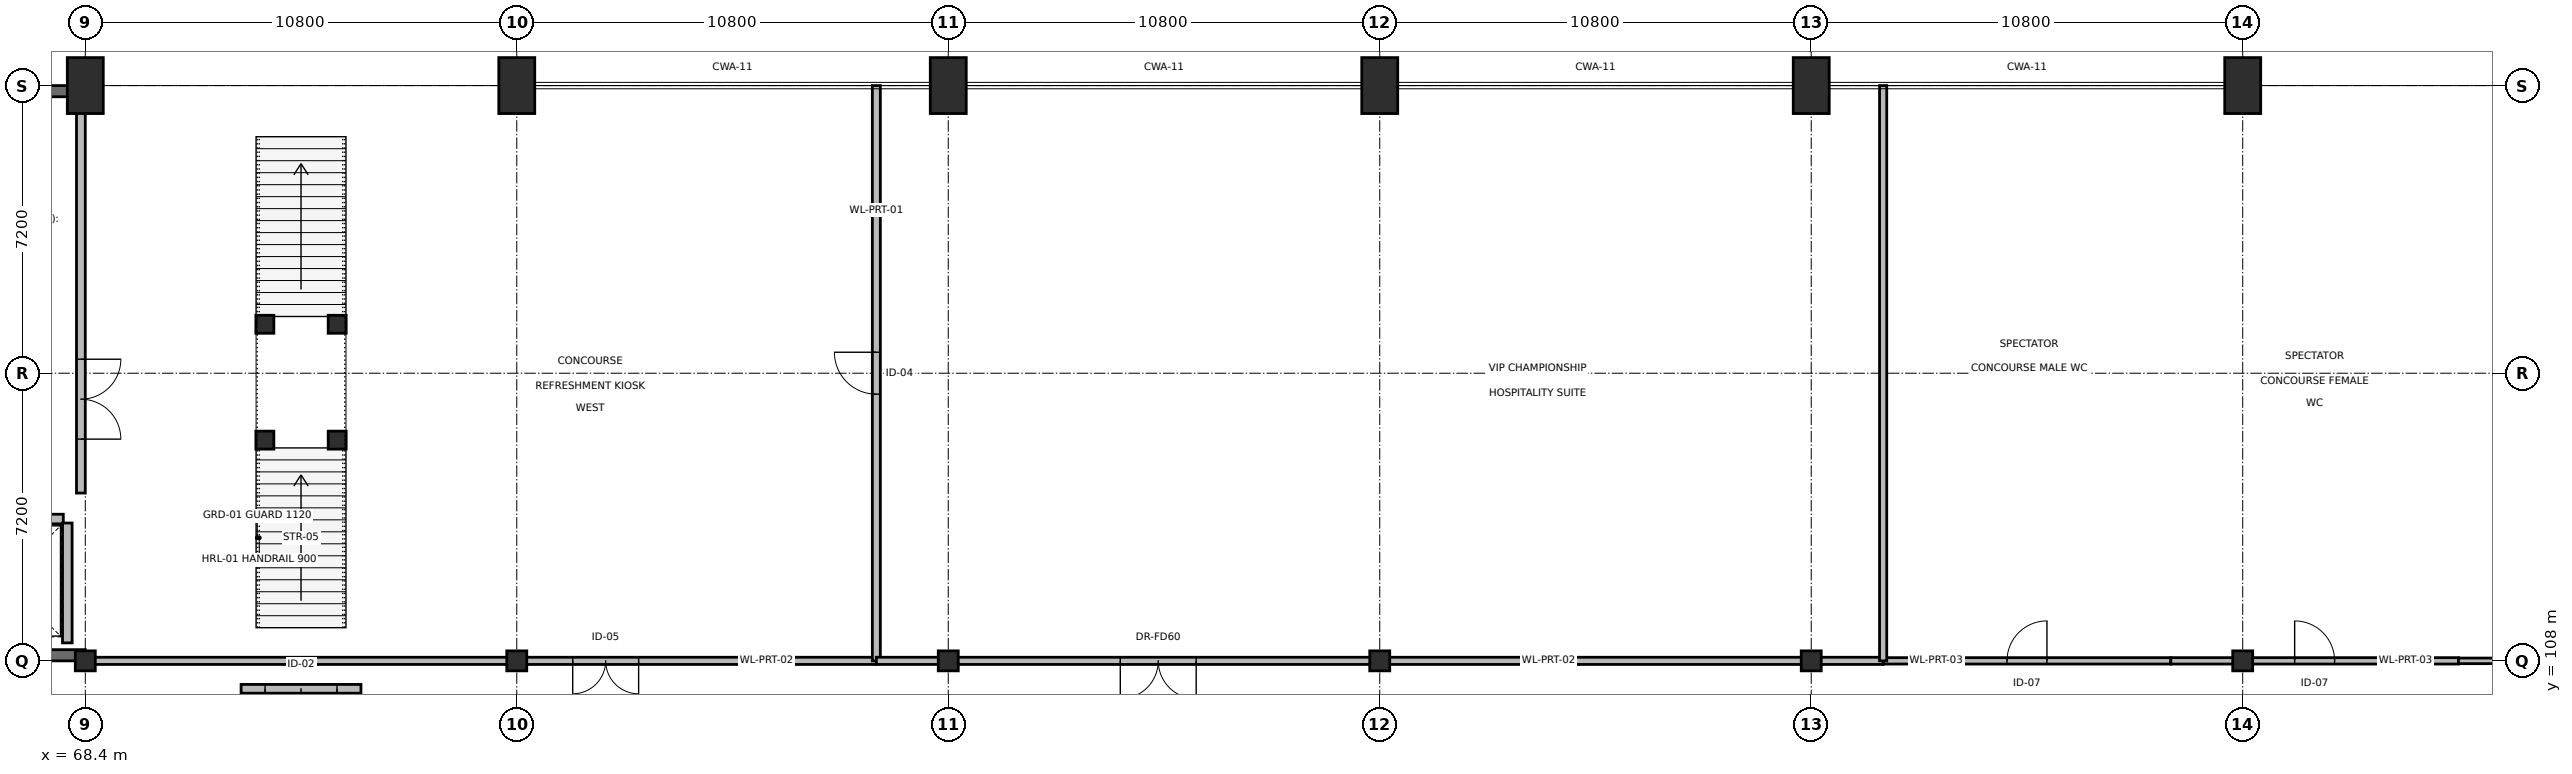
"""IFC4 building model, lengths in metres.
Left out: names, types, materials, properties, quantities, classifications, styles, units other than length and angle.
Written with IfcOpenShell. Run it as: python <this file> out.ifc"""

import sys

from ifc_helpers import new_model, si_unit, direction, frame, frame_2d, origin, origin_2d, place, context, subcontext, project, spatial, rectangle, extrude, element, fill, save


model = new_model("IFC4")
c1 = context("Model", 3, precision=1e-05, world=origin(), true_north=direction((0.0, 1.0)))
c2 = subcontext(c1, "Body", "Model", "MODEL_VIEW")
j1 = project(units=[si_unit("LENGTHUNIT", "METRE"), si_unit("PLANEANGLEUNIT", "RADIAN")], contexts=[c1])
p1 = place(None, origin())
s1 = spatial("IfcSite", under=j1, at=p1, CompositionType="ELEMENT")
p2 = place(p1, origin())
s2 = spatial("IfcBuilding", under=s1, at=p2, CompositionType="ELEMENT")
p3 = place(p2, frame((0.0, 0.0, 4.8)))
s3 = spatial("IfcBuildingStorey", under=s2, at=p3, CompositionType="ELEMENT", Elevation=4.8)
for number, where, z_axis, x_axis in (
    (1, (68.4, 122.4, 0.0), (0.0, 0.0, 1.0), (1.0, 0.0, 0.0)),
    (2, (111.6, 122.4, 0.0), (0.0, 0.0, 1.0), (1.0, 0.0, 0.0)),
    (3, (79.2, 122.4, 0.0), (0.0, 0.0, 1.0), (1.0, 0.0, 0.0)),
    (4, (90.0, 122.4, 0.0), (0.0, 0.0, 1.0), (1.0, 0.0, 0.0)),
    (5, (100.8, 122.4, 0.0), (0.0, 0.0, 1.0), (1.0, 0.0, 0.0)),
    (6, (122.4, 122.4, 0.0), (0.0, 0.0, 1.0), (1.0, 0.0, 0.0)),
):
    element("IfcColumn", number, at=place(p3, frame(where, z_axis=z_axis, x_axis=x_axis)), inside=s3, PredefinedType="COLUMN", context=c2, shape_type="SweptSolid", body=[
        extrude(rectangle(XDim=0.9, YDim=1.4, at=origin_2d()), origin(), (0.0, 0.0, 1.0), 4.8),
    ])
for number, where, z_axis, x_axis in (
    (7, (68.4, 108.0, 0.0), (0.0, 0.0, 1.0), (1.0, 0.0, 0.0)),
    (8, (79.2, 108.0, 0.0), (0.0, 0.0, 1.0), (1.0, 0.0, 0.0)),
    (9, (90.0, 108.0, 0.0), (0.0, 0.0, 1.0), (1.0, 0.0, 0.0)),
    (10, (100.8, 108.0, 0.0), (0.0, 0.0, 1.0), (1.0, 0.0, 0.0)),
    (11, (111.6, 108.0, 0.0), (0.0, 0.0, 1.0), (1.0, 0.0, 0.0)),
    (12, (122.4, 108.0, 0.0), (0.0, 0.0, 1.0), (1.0, 0.0, 0.0)),
):
    element("IfcColumn", number, at=place(p3, frame(where, z_axis=z_axis, x_axis=x_axis)), inside=s3, PredefinedType="COLUMN", context=c2, shape_type="SweptSolid", body=[
        extrude(rectangle(XDim=0.5, YDim=0.5, at=origin_2d()), origin(), (0.0, 0.0, 1.0), 4.8),
    ])
for number, where, z_axis, x_axis in (
    (13, (72.895, 113.525, 0.0), (0.0, 0.0, 1.0), (1.0, 0.0, 0.0)),
    (14, (72.895, 116.425, 0.0), (0.0, 0.0, 1.0), (1.0, 0.0, 0.0)),
    (15, (74.705, 113.525, 0.0), (0.0, 0.0, 1.0), (1.0, 0.0, 0.0)),
    (16, (74.705, 116.425, 0.0), (0.0, 0.0, 1.0), (1.0, 0.0, 0.0)),
):
    element("IfcColumn", number, at=place(p3, frame(where, z_axis=z_axis, x_axis=x_axis)), inside=s3, PredefinedType="COLUMN", context=c2, shape_type="SweptSolid", body=[
        extrude(rectangle(XDim=0.45, YDim=0.45, at=origin_2d()), origin(), (0.0, 0.0, 1.0), 2.24),
    ])
for number, where, z_axis, x_axis in (
    (17, (57.6, 108.14, 0.0), (0.0, 0.0, 1.0), (1.0, 0.0, 0.0)),
    (18, (57.6, 122.26, 0.0), (0.0, 0.0, 1.0), (1.0, 0.0, 0.0)),
):
    element("IfcWall", number, at=place(p3, frame(where, z_axis=z_axis, x_axis=x_axis)), inside=s3, PredefinedType="SHEAR", context=c2, shape_type="SweptSolid", body=[
        extrude(rectangle(XDim=10.8, YDim=0.28, at=frame_2d((5.4, 0.0))), origin(), (0.0, 0.0, 1.0), 4.8),
    ])
p4 = place(p3, frame((64.95, 111.55, 0.0), z_axis=(0.0, 0.0, 1.0), x_axis=(1.0, 0.0, 0.0)))
e19 = element("IfcWall", 19, at=p4, inside=s3, PredefinedType="SOLIDWALL", context=c2, shape_type="SweptSolid", body=[
    extrude(rectangle(XDim=2.9, YDim=0.24, at=frame_2d((1.45, 0.0))), origin(), (0.0, 0.0, 1.0), 4.505),
])
p5 = place(p4, frame((0.9, 0.0, 0.0)))
e20 = element("IfcOpeningElement", 20, at=p5, cuts=e19, PredefinedType="OPENING", context=c2, shape_type="SweptSolid", body=[
    extrude(rectangle(XDim=1.1, YDim=2.15, at=frame_2d((0.55, 1.075))), frame((0.0, 0.13, 0.0), z_axis=(0.0, -1.0, 0.0), x_axis=(1.0, 0.0, 0.0)), (0.0, 0.0, 1.0), 0.26),
])
p6 = place(p3, frame((67.95, 108.45, 0.0), z_axis=(0.0, 0.0, 1.0), x_axis=(0.0, 1.0, 0.0)))
e21 = element("IfcWall", 21, at=p6, inside=s3, PredefinedType="SOLIDWALL", context=c2, shape_type="SweptSolid", body=[
    extrude(rectangle(XDim=3.0, YDim=0.24, at=frame_2d((1.5, 0.0))), origin(), (0.0, 0.0, 1.0), 4.505),
])
p7 = place(p3, frame((68.29, 112.2, 0.0), z_axis=(0.0, 0.0, 1.0), x_axis=(0.0, 1.0, 0.0)))
e22 = element("IfcWall", 22, at=p7, inside=s3, PredefinedType="PARTITIONING", context=c2, shape_type="SweptSolid", body=[
    extrude(rectangle(XDim=9.75, YDim=0.22, at=frame_2d((4.875, 0.0))), origin(), (0.0, 0.0, 1.0), 3.785),
])
p8 = place(p7, frame((1.35, 0.0, 0.0)))
e23 = element("IfcOpeningElement", 23, at=p8, cuts=e22, PredefinedType="OPENING", context=c2, shape_type="SweptSolid", body=[
    extrude(rectangle(XDim=2.0, YDim=2.2, at=frame_2d((1.0, 1.1))), frame((0.0, 0.12, 0.0), z_axis=(0.0, -1.0, 0.0), x_axis=(1.0, 0.0, 0.0)), (0.0, 0.0, 1.0), 0.24),
])
p9 = place(p3, frame((68.4, 108.0, 0.0), z_axis=(0.0, 0.0, 1.0), x_axis=(1.0, 0.0, 0.0)))
e24 = element("IfcWall", 24, at=p9, inside=s3, PredefinedType="PARTITIONING", context=c2, shape_type="SweptSolid", body=[
    extrude(rectangle(XDim=19.8, YDim=0.18, at=frame_2d((9.9, 0.0))), origin(), (0.0, 0.0, 1.0), 3.495),
])
p10 = place(p9, frame((12.2, 0.0, 0.0)))
e25 = element("IfcOpeningElement", 25, at=p10, cuts=e24, PredefinedType="OPENING", context=c2, shape_type="SweptSolid", body=[
    extrude(rectangle(XDim=1.65, YDim=2.2, at=frame_2d((0.825, 1.1))), frame((0.0, 0.1, 0.0), z_axis=(0.0, -1.0, 0.0), x_axis=(1.0, 0.0, 0.0)), (0.0, 0.0, 1.0), 0.2),
])
p11 = place(p3, frame((113.4, 108.0, 0.0), z_axis=(0.0, 0.0, 1.0), x_axis=(1.0, 0.0, 0.0)))
e26 = element("IfcWall", 26, at=p11, inside=s3, PredefinedType="PARTITIONING", context=c2, shape_type="SweptSolid", body=[
    extrude(rectangle(XDim=7.2, YDim=0.16, at=frame_2d((3.6, 0.0))), origin(), (0.0, 0.0, 1.0), 3.685),
])
p12 = place(p11, frame((3.1, 0.0, 0.0)))
e27 = element("IfcOpeningElement", 27, at=p12, cuts=e26, PredefinedType="OPENING", context=c2, shape_type="SweptSolid", body=[
    extrude(rectangle(XDim=1.0, YDim=2.1, at=frame_2d((0.5, 1.05))), frame((0.0, 0.09, 0.0), z_axis=(0.0, -1.0, 0.0), x_axis=(1.0, 0.0, 0.0)), (0.0, 0.0, 1.0), 0.18),
])
p13 = place(p3, frame((120.6, 108.0, 0.0), z_axis=(0.0, 0.0, 1.0), x_axis=(1.0, 0.0, 0.0)))
e28 = element("IfcWall", 28, at=p13, inside=s3, PredefinedType="PARTITIONING", context=c2, shape_type="SweptSolid", body=[
    extrude(rectangle(XDim=7.2, YDim=0.16, at=frame_2d((3.6, 0.0))), origin(), (0.0, 0.0, 1.0), 3.495),
])
p14 = place(p13, frame((3.1, 0.0, 0.0)))
e29 = element("IfcOpeningElement", 29, at=p14, cuts=e28, PredefinedType="OPENING", context=c2, shape_type="SweptSolid", body=[
    extrude(rectangle(XDim=1.0, YDim=2.1, at=frame_2d((0.5, 1.05))), frame((0.0, 0.09, 0.0), z_axis=(0.0, -1.0, 0.0), x_axis=(1.0, 0.0, 0.0)), (0.0, 0.0, 1.0), 0.18),
])
p15 = place(p3, frame((127.8, 108.0, 0.0), z_axis=(0.0, 0.0, 1.0), x_axis=(1.0, 0.0, 0.0)))
e30 = element("IfcWall", 30, at=p15, inside=s3, PredefinedType="PARTITIONING", context=c2, shape_type="SweptSolid", body=[
    extrude(rectangle(XDim=5.4, YDim=0.14, at=frame_2d((2.7, 0.0))), origin(), (0.0, 0.0, 1.0), 3.495),
])
p16 = place(p15, frame((2.1, 0.0, 0.0)))
e31 = element("IfcOpeningElement", 31, at=p16, cuts=e30, PredefinedType="OPENING", context=c2, shape_type="SweptSolid", body=[
    extrude(rectangle(XDim=1.05, YDim=2.2, at=frame_2d((0.525, 1.1))), frame((0.0, 0.08, 0.0), z_axis=(0.0, -1.0, 0.0), x_axis=(1.0, 0.0, 0.0)), (0.0, 0.0, 1.0), 0.16),
])
p17 = place(p3, frame((88.2, 108.0, 0.0), z_axis=(0.0, 0.0, 1.0), x_axis=(0.0, 1.0, 0.0)))
e32 = element("IfcWall", 32, at=p17, inside=s3, PredefinedType="PARTITIONING", context=c2, shape_type="SweptSolid", body=[
    extrude(rectangle(XDim=14.4, YDim=0.2, at=frame_2d((7.2, 0.0))), origin(), (0.0, 0.0, 1.0), 3.685),
])
p18 = place(p17, frame((6.675, 0.0, 0.0)))
e33 = element("IfcOpeningElement", 33, at=p18, cuts=e32, PredefinedType="OPENING", context=c2, shape_type="SweptSolid", body=[
    extrude(rectangle(XDim=1.05, YDim=2.15, at=frame_2d((0.525, 1.075))), frame((0.0, 0.11, 0.0), z_axis=(0.0, -1.0, 0.0), x_axis=(1.0, 0.0, 0.0)), (0.0, 0.0, 1.0), 0.22),
])
p19 = place(p3, frame((88.2, 108.0, 0.0), z_axis=(0.0, 0.0, 1.0), x_axis=(1.0, 0.0, 0.0)))
e34 = element("IfcWall", 34, at=p19, inside=s3, PredefinedType="PARTITIONING", context=c2, shape_type="SweptSolid", body=[
    extrude(rectangle(XDim=25.2, YDim=0.18, at=frame_2d((12.6, 0.0))), origin(), (0.0, 0.0, 1.0), 3.495),
])
p20 = place(p19, frame((6.106, 0.0, 0.0)))
e35 = element("IfcOpeningElement", 35, at=p20, cuts=e34, PredefinedType="OPENING", context=c2, shape_type="SweptSolid", body=[
    extrude(rectangle(XDim=1.9, YDim=2.2, at=frame_2d((0.95, 1.1))), frame((0.0, 0.1, 0.0), z_axis=(0.0, -1.0, 0.0), x_axis=(1.0, 0.0, 0.0)), (0.0, 0.0, 1.0), 0.2),
])
p21 = place(p3, frame((113.4, 108.0, 0.0), z_axis=(0.0, 0.0, 1.0), x_axis=(0.0, 1.0, 0.0)))
e36 = element("IfcWall", 36, at=p21, inside=s3, PredefinedType="PARTITIONING", context=c2, shape_type="SweptSolid", body=[
    extrude(rectangle(XDim=14.4, YDim=0.18, at=frame_2d((7.2, 0.0))), origin(), (0.0, 0.0, 1.0), 3.685),
])
p22 = place(p3, frame((72.3, 107.3, 0.0), z_axis=(0.0, 0.0, 1.0), x_axis=(1.0, 0.0, 0.0)))
e37 = element("IfcWall", 37, at=p22, inside=s3, PredefinedType="PARTITIONING", context=c2, shape_type="SweptSolid", body=[
    extrude(rectangle(XDim=3.0, YDim=0.22, at=frame_2d((1.5, 0.0))), origin(), (0.0, 0.0, 1.0), 4.29),
])
p23 = place(p22, frame((0.6, 0.0, 0.0)))
e38 = element("IfcOpeningElement", 38, at=p23, cuts=e37, PredefinedType="OPENING", context=c2, shape_type="SweptSolid", body=[
    extrude(rectangle(XDim=1.8, YDim=2.2, at=frame_2d((0.9, 1.1))), frame((0.0, 0.12, 0.0), z_axis=(0.0, -1.0, 0.0), x_axis=(1.0, 0.0, 0.0)), (0.0, 0.0, 1.0), 0.24),
])
p24 = place(p8, origin())
e39 = element("IfcDoor", 39, at=p24, inside=s3, OperationType="DOUBLE_DOOR_SINGLE_SWING", PredefinedType="DOOR", context=c2, shape_type="SweptSolid", body=[
    extrude(rectangle(XDim=2.0, YDim=2.2, at=frame_2d((1.0, 1.1))), frame((0.0, 0.025, 0.0), z_axis=(0.0, -1.0, 0.0), x_axis=(1.0, 0.0, 0.0)), (0.0, 0.0, 1.0), 0.05),
])
fill(e23, e39)
p25 = place(p10, origin())
e40 = element("IfcDoor", 40, at=p25, inside=s3, OperationType="DOUBLE_DOOR_SINGLE_SWING", PredefinedType="DOOR", context=c2, shape_type="SweptSolid", body=[
    extrude(rectangle(XDim=1.65, YDim=2.2, at=frame_2d((0.825, 1.1))), frame((0.0, 0.025, 0.0), z_axis=(0.0, -1.0, 0.0), x_axis=(1.0, 0.0, 0.0)), (0.0, 0.0, 1.0), 0.05),
])
fill(e25, e40)
p26 = place(p12, origin())
e41 = element("IfcDoor", 41, at=p26, inside=s3, OperationType="SINGLE_SWING_RIGHT", PredefinedType="DOOR", context=c2, shape_type="SweptSolid", body=[
    extrude(rectangle(XDim=1.0, YDim=2.1, at=frame_2d((0.5, 1.05))), frame((0.0, 0.025, 0.0), z_axis=(0.0, -1.0, 0.0), x_axis=(1.0, 0.0, 0.0)), (0.0, 0.0, 1.0), 0.05),
])
fill(e27, e41)
p27 = place(p14, origin())
e42 = element("IfcDoor", 42, at=p27, inside=s3, OperationType="SINGLE_SWING_LEFT", PredefinedType="DOOR", context=c2, shape_type="SweptSolid", body=[
    extrude(rectangle(XDim=1.0, YDim=2.1, at=frame_2d((0.5, 1.05))), frame((0.0, 0.025, 0.0), z_axis=(0.0, -1.0, 0.0), x_axis=(1.0, 0.0, 0.0)), (0.0, 0.0, 1.0), 0.05),
])
fill(e29, e42)
p28 = place(p18, origin())
e43 = element("IfcDoor", 43, at=p28, inside=s3, OperationType="SINGLE_SWING_RIGHT", PredefinedType="DOOR", context=c2, shape_type="SweptSolid", body=[
    extrude(rectangle(XDim=1.05, YDim=2.15, at=frame_2d((0.525, 1.075))), frame((0.0, 0.025, 0.0), z_axis=(0.0, -1.0, 0.0), x_axis=(1.0, 0.0, 0.0)), (0.0, 0.0, 1.0), 0.05),
])
fill(e33, e43)
p29 = place(p20, origin())
e44 = element("IfcDoor", 44, at=p29, inside=s3, OperationType="DOUBLE_DOOR_SINGLE_SWING", PredefinedType="DOOR", context=c2, shape_type="SweptSolid", body=[
    extrude(rectangle(XDim=1.9, YDim=2.2, at=frame_2d((0.95, 1.1))), frame((0.0, 0.025, 0.0), z_axis=(0.0, -1.0, 0.0), x_axis=(1.0, 0.0, 0.0)), (0.0, 0.0, 1.0), 0.05),
])
fill(e35, e44)
p30 = place(p23, origin())
e45 = element("IfcDoor", 45, at=p30, inside=s3, OperationType="DOUBLE_DOOR_SINGLE_SWING", PredefinedType="DOOR", context=c2, shape_type="SweptSolid", body=[
    extrude(rectangle(XDim=1.8, YDim=2.2, at=frame_2d((0.9, 1.1))), frame((0.0, 0.025, 0.0), z_axis=(0.0, -1.0, 0.0), x_axis=(1.0, 0.0, 0.0)), (0.0, 0.0, 1.0), 0.05),
])
fill(e38, e45)
save(model, sys.argv[1])
